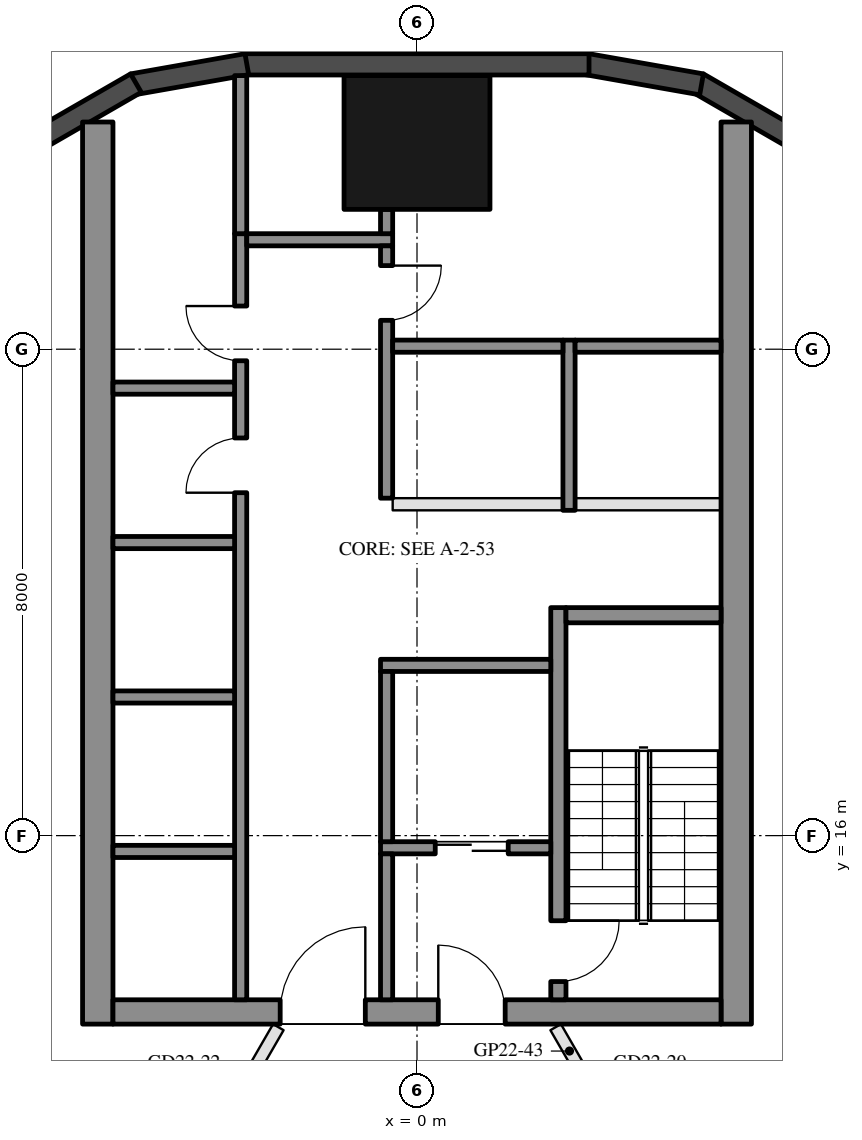
"""IFC4 building model, lengths in metres.
Left out: names, types, materials, properties, quantities, classifications, styles, units other than length and angle.
Written with IfcOpenShell. Run it as: python <this file> out.ifc"""

import sys

from ifc_helpers import new_model, si_unit, direction, frame, frame_2d, origin, origin_2d, place, context, subcontext, project, spatial, rectangle, hollow_rectangle, extrude, element, fill, save


model = new_model("IFC4")
c1 = context("Model", 3, precision=1e-05, world=origin(), true_north=direction((0.0, 1.0)))
c2 = subcontext(c1, "Body", "Model", "MODEL_VIEW")
j1 = project(units=[si_unit("LENGTHUNIT", "METRE"), si_unit("PLANEANGLEUNIT", "RADIAN")], contexts=[c1])
p1 = place(None, origin())
s1 = spatial("IfcSite", under=j1, at=p1, CompositionType="ELEMENT")
p2 = place(p1, origin())
s2 = spatial("IfcBuilding", under=s1, at=p2, CompositionType="ELEMENT")
p3 = place(p2, frame((0.0, 0.0, 228.0)))
s3 = spatial("IfcBuildingStorey", under=s2, at=p3, CompositionType="ELEMENT", Elevation=228.0)
p4 = place(p3, frame((0.0, 27.4, 0.0), z_axis=(0.0, 0.0, 1.0), x_axis=(1.0, 0.0, 0.0)))
e1 = element("IfcColumn", 1, at=p4, inside=s3, PredefinedType="COLUMN", context=c2, shape_type="SweptSolid", body=[
    extrude(hollow_rectangle(XDim=2.4, YDim=2.2, WallThickness=0.06, at=origin_2d()), origin(), (0.0, 0.0, 1.0), 3.7),
])
for number, where, z_axis, x_axis in (
    (2, (6.277, 27.422, 0.0), (0.0, 0.0, 1.0), (-0.866, 0.5, 0.0)),
    (3, (4.68, 28.356, 0.0), (0.0, 0.0, 1.0), (-0.985, 0.174, 0.0)),
):
    element("IfcWall", number, at=place(p3, frame(where, z_axis=z_axis, x_axis=x_axis)), inside=s3, PredefinedType="SOLIDWALL", context=c2, shape_type="SweptSolid", body=[
        extrude(rectangle(XDim=1.91, YDim=0.35, at=frame_2d((0.955, 0.0))), origin(), (0.0, 0.0, 1.0), 3.45),
    ])
p5 = place(p3, frame((2.829, 28.685, 0.0), z_axis=(0.0, 0.0, 1.0), x_axis=(-1.0, 0.0, 0.0)))
e4 = element("IfcWall", 4, at=p5, inside=s3, PredefinedType="SOLIDWALL", context=c2, shape_type="SweptSolid", body=[
    extrude(rectangle(XDim=5.658, YDim=0.35, at=frame_2d((2.829, 0.0))), origin(), (0.0, 0.0, 1.0), 3.45),
])
for number, where, z_axis, x_axis in (
    (5, (-2.799, 28.688, 0.0), (0.0, 0.0, 1.0), (-0.985, -0.174, 0.0)),
    (6, (-4.623, 28.377, 0.0), (0.0, 0.0, 1.0), (-0.866, -0.5, 0.0)),
):
    element("IfcWall", number, at=place(p3, frame(where, z_axis=z_axis, x_axis=x_axis)), inside=s3, PredefinedType="SOLIDWALL", context=c2, shape_type="SweptSolid", body=[
        extrude(rectangle(XDim=1.91, YDim=0.35, at=frame_2d((0.955, 0.0))), origin(), (0.0, 0.0, 1.0), 3.45),
    ])
for number, where, z_axis, x_axis in (
    (7, (5.25, 12.9, 0.0), (0.0, 0.0, 1.0), (0.0, 1.0, 0.0)),
    (8, (-5.25, 12.9, 0.0), (0.0, 0.0, 1.0), (0.0, 1.0, 0.0)),
):
    element("IfcWall", number, at=place(p3, frame(where, z_axis=z_axis, x_axis=x_axis)), inside=s3, PredefinedType="SHEAR", context=c2, shape_type="SweptSolid", body=[
        extrude(rectangle(XDim=14.837, YDim=0.5, at=frame_2d((7.418, 0.0))), origin(), (0.0, 0.0, 1.0), 3.45),
    ])
p6 = place(p3, frame((5.0, 13.1, 0.0), z_axis=(0.0, 0.0, 1.0), x_axis=(-1.0, 0.0, 0.0)))
e9 = element("IfcWall", 9, at=p6, inside=s3, PredefinedType="SHEAR", context=c2, shape_type="SweptSolid", body=[
    extrude(rectangle(XDim=10.0, YDim=0.4, at=frame_2d((5.0, 0.0))), origin(), (0.0, 0.0, 1.0), 3.45),
])
p7 = place(p6, frame((3.55, 0.0, 0.0)))
e10 = element("IfcOpeningElement", 10, at=p7, cuts=e9, PredefinedType="OPENING", context=c2, shape_type="SweptSolid", body=[
    extrude(rectangle(XDim=1.1, YDim=2.1, at=frame_2d((0.55, 1.05))), frame((0.0, 0.21, 0.0), z_axis=(0.0, -1.0, 0.0), x_axis=(1.0, 0.0, 0.0)), (0.0, 0.0, 1.0), 0.42),
])
p8 = place(p6, frame((5.85, 0.0, 0.0)))
e11 = element("IfcOpeningElement", 11, at=p8, cuts=e9, PredefinedType="OPENING", context=c2, shape_type="SweptSolid", body=[
    extrude(rectangle(XDim=1.4, YDim=2.1, at=frame_2d((0.7, 1.05))), frame((0.0, 0.21, 0.0), z_axis=(0.0, -1.0, 0.0), x_axis=(1.0, 0.0, 0.0)), (0.0, 0.0, 1.0), 0.42),
])
p9 = place(p3, frame((2.325, 13.3, 0.0), z_axis=(0.0, 0.0, 1.0), x_axis=(0.0, 1.0, 0.0)))
e12 = element("IfcWall", 12, at=p9, inside=s3, PredefinedType="SHEAR", context=c2, shape_type="SweptSolid", body=[
    extrude(rectangle(XDim=6.45, YDim=0.25, at=frame_2d((3.225, 0.0))), origin(), (0.0, 0.0, 1.0), 3.45),
])
p10 = place(p9, frame((0.3, 0.0, 0.0)))
e13 = element("IfcOpeningElement", 13, at=p10, cuts=e12, PredefinedType="OPENING", context=c2, shape_type="SweptSolid", body=[
    extrude(rectangle(XDim=1.0, YDim=2.1, at=frame_2d((0.5, 1.05))), frame((0.0, 0.135, 0.0), z_axis=(0.0, -1.0, 0.0), x_axis=(1.0, 0.0, 0.0)), (0.0, 0.0, 1.0), 0.27),
])
p11 = place(p3, frame((5.0, 19.625, 0.0), z_axis=(0.0, 0.0, 1.0), x_axis=(-1.0, 0.0, 0.0)))
e14 = element("IfcWall", 14, at=p11, inside=s3, PredefinedType="SHEAR", context=c2, shape_type="SweptSolid", body=[
    extrude(rectangle(XDim=2.55, YDim=0.25, at=frame_2d((1.275, 0.0))), origin(), (0.0, 0.0, 1.0), 3.45),
])
p12 = place(p3, frame((2.2, 18.8, 0.0), z_axis=(0.0, 0.0, 1.0), x_axis=(-1.0, 0.0, 0.0)))
e15 = element("IfcWall", 15, at=p12, inside=s3, PredefinedType="SHEAR", context=c2, shape_type="SweptSolid", body=[
    extrude(rectangle(XDim=2.8, YDim=0.2, at=frame_2d((1.4, 0.0))), origin(), (0.0, 0.0, 1.0), 3.45),
])
p13 = place(p3, frame((2.2, 15.8, 0.0), z_axis=(0.0, 0.0, 1.0), x_axis=(-1.0, 0.0, 0.0)))
e16 = element("IfcWall", 16, at=p13, inside=s3, PredefinedType="SHEAR", context=c2, shape_type="SweptSolid", body=[
    extrude(rectangle(XDim=2.8, YDim=0.2, at=frame_2d((1.4, 0.0))), origin(), (0.0, 0.0, 1.0), 3.45),
])
p14 = place(p13, frame((0.7, 0.0, 0.0)))
e17 = element("IfcOpeningElement", 17, at=p14, cuts=e16, PredefinedType="OPENING", context=c2, shape_type="SweptSolid", body=[
    extrude(rectangle(XDim=1.2, YDim=2.1, at=frame_2d((0.6, 1.05))), frame((0.0, 0.11, 0.0), z_axis=(0.0, -1.0, 0.0), x_axis=(1.0, 0.0, 0.0)), (0.0, 0.0, 1.0), 0.22),
])
p15 = place(p3, frame((-0.5, 15.9, 0.0), z_axis=(0.0, 0.0, 1.0), x_axis=(0.0, 1.0, 0.0)))
e18 = element("IfcWall", 18, at=p15, inside=s3, PredefinedType="SHEAR", context=c2, shape_type="SweptSolid", body=[
    extrude(rectangle(XDim=2.8, YDim=0.2, at=frame_2d((1.4, 0.0))), origin(), (0.0, 0.0, 1.0), 3.45),
])
p16 = place(p3, frame((-0.5, 13.3, 0.0), z_axis=(0.0, 0.0, 1.0), x_axis=(0.0, 1.0, 0.0)))
e19 = element("IfcWall", 19, at=p16, inside=s3, PredefinedType="SHEAR", context=c2, shape_type="SweptSolid", body=[
    extrude(rectangle(XDim=2.4, YDim=0.2, at=frame_2d((1.2, 0.0))), origin(), (0.0, 0.0, 1.0), 3.45),
])
p17 = place(p3, frame((-2.9, 13.3, 0.0), z_axis=(0.0, 0.0, 1.0), x_axis=(0.0, 1.0, 0.0)))
e20 = element("IfcWall", 20, at=p17, inside=s3, PredefinedType="SHEAR", context=c2, shape_type="SweptSolid", body=[
    extrude(rectangle(XDim=12.6, YDim=0.2, at=frame_2d((6.3, 0.0))), origin(), (0.0, 0.0, 1.0), 3.45),
])
p18 = place(p17, frame((8.34, 0.0, 0.0)))
e21 = element("IfcOpeningElement", 21, at=p18, cuts=e20, PredefinedType="OPENING", context=c2, shape_type="SweptSolid", body=[
    extrude(rectangle(XDim=0.9, YDim=2.1, at=frame_2d((0.45, 1.05))), frame((0.0, 0.11, 0.0), z_axis=(0.0, -1.0, 0.0), x_axis=(1.0, 0.0, 0.0)), (0.0, 0.0, 1.0), 0.22),
])
p19 = place(p17, frame((10.51, 0.0, 0.0)))
e22 = element("IfcOpeningElement", 22, at=p19, cuts=e20, PredefinedType="OPENING", context=c2, shape_type="SweptSolid", body=[
    extrude(rectangle(XDim=0.9, YDim=2.1, at=frame_2d((0.45, 1.05))), frame((0.0, 0.11, 0.0), z_axis=(0.0, -1.0, 0.0), x_axis=(1.0, 0.0, 0.0)), (0.0, 0.0, 1.0), 0.22),
])
p20 = place(p3, frame((-0.4, 25.8, 0.0), z_axis=(0.0, 0.0, 1.0), x_axis=(-1.0, 0.0, 0.0)))
e23 = element("IfcWall", 23, at=p20, inside=s3, PredefinedType="SHEAR", context=c2, shape_type="SweptSolid", body=[
    extrude(rectangle(XDim=2.4, YDim=0.2, at=frame_2d((1.2, 0.0))), origin(), (0.0, 0.0, 1.0), 3.45),
])
p21 = place(p3, frame((-0.5, 21.55, 0.0), z_axis=(0.0, 0.0, 1.0), x_axis=(0.0, 1.0, 0.0)))
e24 = element("IfcWall", 24, at=p21, inside=s3, PredefinedType="SHEAR", context=c2, shape_type="SweptSolid", body=[
    extrude(rectangle(XDim=4.15, YDim=0.2, at=frame_2d((2.075, 0.0))), origin(), (0.0, 0.0, 1.0), 3.45),
])
p22 = place(p21, frame((2.925, 0.0, 0.0)))
e25 = element("IfcOpeningElement", 25, at=p22, cuts=e24, PredefinedType="OPENING", context=c2, shape_type="SweptSolid", body=[
    extrude(rectangle(XDim=0.9, YDim=2.1, at=frame_2d((0.45, 1.05))), frame((0.0, 0.11, 0.0), z_axis=(0.0, -1.0, 0.0), x_axis=(1.0, 0.0, 0.0)), (0.0, 0.0, 1.0), 0.22),
])
for number, where, z_axis, x_axis in (
    (26, (-3.0, 15.74, 0.0), (0.0, 0.0, 1.0), (-1.0, 0.0, 0.0)),
    (27, (-3.0, 18.28, 0.0), (0.0, 0.0, 1.0), (-1.0, 0.0, 0.0)),
    (28, (-3.0, 20.82, 0.0), (0.0, 0.0, 1.0), (-1.0, 0.0, 0.0)),
    (29, (-3.0, 23.36, 0.0), (0.0, 0.0, 1.0), (-1.0, 0.0, 0.0)),
):
    element("IfcWall", number, at=place(p3, frame(where, z_axis=z_axis, x_axis=x_axis)), inside=s3, PredefinedType="SHEAR", context=c2, shape_type="SweptSolid", body=[
        extrude(rectangle(XDim=2.0, YDim=0.2, at=frame_2d((1.0, 0.0))), origin(), (0.0, 0.0, 1.0), 3.45),
    ])
p23 = place(p3, frame((-0.5, 25.9, 0.0), z_axis=(0.0, 0.0, 1.0), x_axis=(0.0, 1.0, 0.0)))
e30 = element("IfcWall", 30, at=p23, inside=s3, PredefinedType="SHEAR", context=c2, shape_type="SweptSolid", body=[
    extrude(rectangle(XDim=0.4, YDim=0.2, at=frame_2d((0.2, 0.0))), origin(), (0.0, 0.0, 1.0), 3.45),
])
p24 = place(p3, frame((-2.9, 25.9, 0.0), z_axis=(0.0, 0.0, 1.0), x_axis=(0.0, 1.0, 0.0)))
e31 = element("IfcWall", 31, at=p24, inside=s3, PredefinedType="SHEAR", context=c2, shape_type="SweptSolid", body=[
    extrude(rectangle(XDim=2.6, YDim=0.2, at=frame_2d((1.3, 0.0))), origin(), (0.0, 0.0, 1.0), 3.45),
])
p25 = place(p3, frame((2.5, 21.35, 0.0), z_axis=(0.0, 0.0, 1.0), x_axis=(0.0, 1.0, 0.0)))
e32 = element("IfcWall", 32, at=p25, inside=s3, PredefinedType="SHEAR", context=c2, shape_type="SweptSolid", body=[
    extrude(rectangle(XDim=2.8, YDim=0.2, at=frame_2d((1.4, 0.0))), origin(), (0.0, 0.0, 1.0), 3.45),
])
p26 = place(p3, frame((5.0, 24.05, 0.0), z_axis=(0.0, 0.0, 1.0), x_axis=(-1.0, 0.0, 0.0)))
e33 = element("IfcWall", 33, at=p26, inside=s3, PredefinedType="SHEAR", context=c2, shape_type="SweptSolid", body=[
    extrude(rectangle(XDim=2.4, YDim=0.2, at=frame_2d((1.2, 0.0))), origin(), (0.0, 0.0, 1.0), 3.45),
])
p27 = place(p3, frame((2.4, 24.05, 0.0), z_axis=(0.0, 0.0, 1.0), x_axis=(-1.0, 0.0, 0.0)))
e34 = element("IfcWall", 34, at=p27, inside=s3, PredefinedType="SHEAR", context=c2, shape_type="SweptSolid", body=[
    extrude(rectangle(XDim=2.8, YDim=0.2, at=frame_2d((1.4, 0.0))), origin(), (0.0, 0.0, 1.0), 3.45),
])
p28 = place(p3, frame((5.0, 21.45, 0.0), z_axis=(0.0, 0.0, 1.0), x_axis=(-1.0, 0.0, 0.0)))
e35 = element("IfcWall", 35, at=p28, inside=s3, PredefinedType="PARTITIONING", context=c2, shape_type="SweptSolid", body=[
    extrude(rectangle(XDim=2.4, YDim=0.2, at=frame_2d((1.2, 0.0))), origin(), (0.0, 0.0, 1.0), 3.45),
])
p29 = place(p3, frame((2.4, 21.45, 0.0), z_axis=(0.0, 0.0, 1.0), x_axis=(-1.0, 0.0, 0.0)))
e36 = element("IfcWall", 36, at=p29, inside=s3, PredefinedType="PARTITIONING", context=c2, shape_type="SweptSolid", body=[
    extrude(rectangle(XDim=2.8, YDim=0.2, at=frame_2d((1.4, 0.0))), origin(), (0.0, 0.0, 1.0), 3.45),
])
p30 = place(p3, frame((13.952, 14.395, 0.0), z_axis=(0.0, 0.0, 1.0), x_axis=(-0.892890171934, -0.450274517226, 0.0)))
e37 = element("IfcWall", 37, at=p30, inside=s3, PredefinedType="PARTITIONING", context=c2, shape_type="SweptSolid", body=[
    extrude(rectangle(XDim=10.998, YDim=0.2, at=frame_2d((5.499, 0.0))), origin(), (0.0, 0.0, 1.0), 2.96),
])
p31 = place(p3, frame((-13.427, 13.504, 0.0), z_axis=(0.0, 0.0, 1.0), x_axis=(0.916759471343, -0.399439697204, 0.0)))
e38 = element("IfcWall", 38, at=p31, inside=s3, PredefinedType="PARTITIONING", context=c2, shape_type="SweptSolid", body=[
    extrude(rectangle(XDim=10.144, YDim=0.2, at=frame_2d((5.072, 0.0))), origin(), (0.0, 0.0, 1.0), 2.96),
])
p32 = place(p3, frame((2.281, 12.85, 0.0), z_axis=(0.0, 0.0, 1.0), x_axis=(0.499985062256, -0.866034027923, 0.0)))
e39 = element("IfcWall", 39, at=p32, inside=s3, PredefinedType="PARTITIONING", context=c2, shape_type="SweptSolid", body=[
    extrude(rectangle(XDim=3.782, YDim=0.2, at=frame_2d((1.891, 0.0))), origin(), (0.0, 0.0, 1.0), 2.76),
])
p33 = place(p32, frame((1.391, 0.0, 0.0)))
e40 = element("IfcOpeningElement", 40, at=p33, cuts=e39, PredefinedType="OPENING", context=c2, shape_type="SweptSolid", body=[
    extrude(rectangle(XDim=1.0, YDim=2.1, at=frame_2d((0.5, 1.05))), frame((0.0, 0.11, 0.0), z_axis=(0.0, -1.0, 0.0), x_axis=(1.0, 0.0, 0.0)), (0.0, 0.0, 1.0), 0.22),
])
p34 = place(p3, frame((-4.169, 9.58, 0.0), z_axis=(0.0, 0.0, 1.0), x_axis=(0.499991068497, 0.866030560329, 0.0)))
e41 = element("IfcWall", 41, at=p34, inside=s3, PredefinedType="PARTITIONING", context=c2, shape_type="SweptSolid", body=[
    extrude(rectangle(XDim=3.776, YDim=0.2, at=frame_2d((1.888, 0.0))), origin(), (0.0, 0.0, 1.0), 2.76),
])
p35 = place(p34, frame((1.388, 0.0, 0.0)))
e42 = element("IfcOpeningElement", 42, at=p35, cuts=e41, PredefinedType="OPENING", context=c2, shape_type="SweptSolid", body=[
    extrude(rectangle(XDim=1.0, YDim=2.1, at=frame_2d((0.5, 1.05))), frame((0.0, 0.11, 0.0), z_axis=(0.0, -1.0, 0.0), x_axis=(1.0, 0.0, 0.0)), (0.0, 0.0, 1.0), 0.22),
])
p36 = place(p14, origin())
e43 = element("IfcDoor", 43, at=p36, inside=s3, OperationType="DOUBLE_DOOR_SLIDING", PredefinedType="DOOR", context=c2, shape_type="SweptSolid", body=[
    extrude(rectangle(XDim=1.2, YDim=2.1, at=frame_2d((0.6, 1.05))), frame((0.0, 0.025, 0.0), z_axis=(0.0, -1.0, 0.0), x_axis=(1.0, 0.0, 0.0)), (0.0, 0.0, 1.0), 0.05),
])
fill(e17, e43)
p37 = place(p18, origin())
e44 = element("IfcDoor", 44, at=p37, inside=s3, OperationType="SINGLE_SWING_LEFT", PredefinedType="DOOR", context=c2, shape_type="SweptSolid", body=[
    extrude(rectangle(XDim=0.9, YDim=2.1, at=frame_2d((0.45, 1.05))), frame((0.0, 0.025, 0.0), z_axis=(0.0, -1.0, 0.0), x_axis=(1.0, 0.0, 0.0)), (0.0, 0.0, 1.0), 0.05),
])
fill(e21, e44)
p38 = place(p19, origin())
e45 = element("IfcDoor", 45, at=p38, inside=s3, OperationType="SINGLE_SWING_RIGHT", PredefinedType="DOOR", context=c2, shape_type="SweptSolid", body=[
    extrude(rectangle(XDim=0.9, YDim=2.1, at=frame_2d((0.45, 1.05))), frame((0.0, 0.025, 0.0), z_axis=(0.0, -1.0, 0.0), x_axis=(1.0, 0.0, 0.0)), (0.0, 0.0, 1.0), 0.05),
])
fill(e22, e45)
p39 = place(p22, frame((0.9, 0.0, 0.0), z_axis=(0.0, 0.0, 1.0), x_axis=(-1.0, 0.0, 0.0)))
e46 = element("IfcDoor", 46, at=p39, inside=s3, OperationType="SINGLE_SWING_LEFT", PredefinedType="DOOR", context=c2, shape_type="SweptSolid", body=[
    extrude(rectangle(XDim=0.9, YDim=2.1, at=frame_2d((0.45, 1.05))), frame((0.0, 0.025, 0.0), z_axis=(0.0, -1.0, 0.0), x_axis=(1.0, 0.0, 0.0)), (0.0, 0.0, 1.0), 0.05),
])
fill(e25, e46)
p40 = place(p7, frame((1.1, 0.0, 0.0), z_axis=(0.0, 0.0, 1.0), x_axis=(-1.0, 0.0, 0.0)))
e47 = element("IfcDoor", 47, at=p40, inside=s3, OperationType="SINGLE_SWING_LEFT", PredefinedType="DOOR", context=c2, shape_type="SweptSolid", body=[
    extrude(rectangle(XDim=1.1, YDim=2.1, at=frame_2d((0.55, 1.05))), frame((0.0, 0.025, 0.0), z_axis=(0.0, -1.0, 0.0), x_axis=(1.0, 0.0, 0.0)), (0.0, 0.0, 1.0), 0.05),
])
fill(e10, e47)
p41 = place(p8, frame((1.4, 0.0, 0.0), z_axis=(0.0, 0.0, 1.0), x_axis=(-1.0, 0.0, 0.0)))
e48 = element("IfcDoor", 48, at=p41, inside=s3, OperationType="DOUBLE_DOOR_SINGLE_SWING", PredefinedType="DOOR", context=c2, shape_type="SweptSolid", body=[
    extrude(rectangle(XDim=1.4, YDim=2.1, at=frame_2d((0.7, 1.05))), frame((0.0, 0.025, 0.0), z_axis=(0.0, -1.0, 0.0), x_axis=(1.0, 0.0, 0.0)), (0.0, 0.0, 1.0), 0.05),
])
fill(e11, e48)
p42 = place(p10, frame((1.0, 0.0, 0.0), z_axis=(0.0, 0.0, 1.0), x_axis=(-1.0, 0.0, 0.0)))
e49 = element("IfcDoor", 49, at=p42, inside=s3, OperationType="SINGLE_SWING_LEFT", PredefinedType="DOOR", context=c2, shape_type="SweptSolid", body=[
    extrude(rectangle(XDim=1.0, YDim=2.1, at=frame_2d((0.5, 1.05))), frame((0.0, 0.025, 0.0), z_axis=(0.0, -1.0, 0.0), x_axis=(1.0, 0.0, 0.0)), (0.0, 0.0, 1.0), 0.05),
])
fill(e13, e49)
save(model, sys.argv[1])
